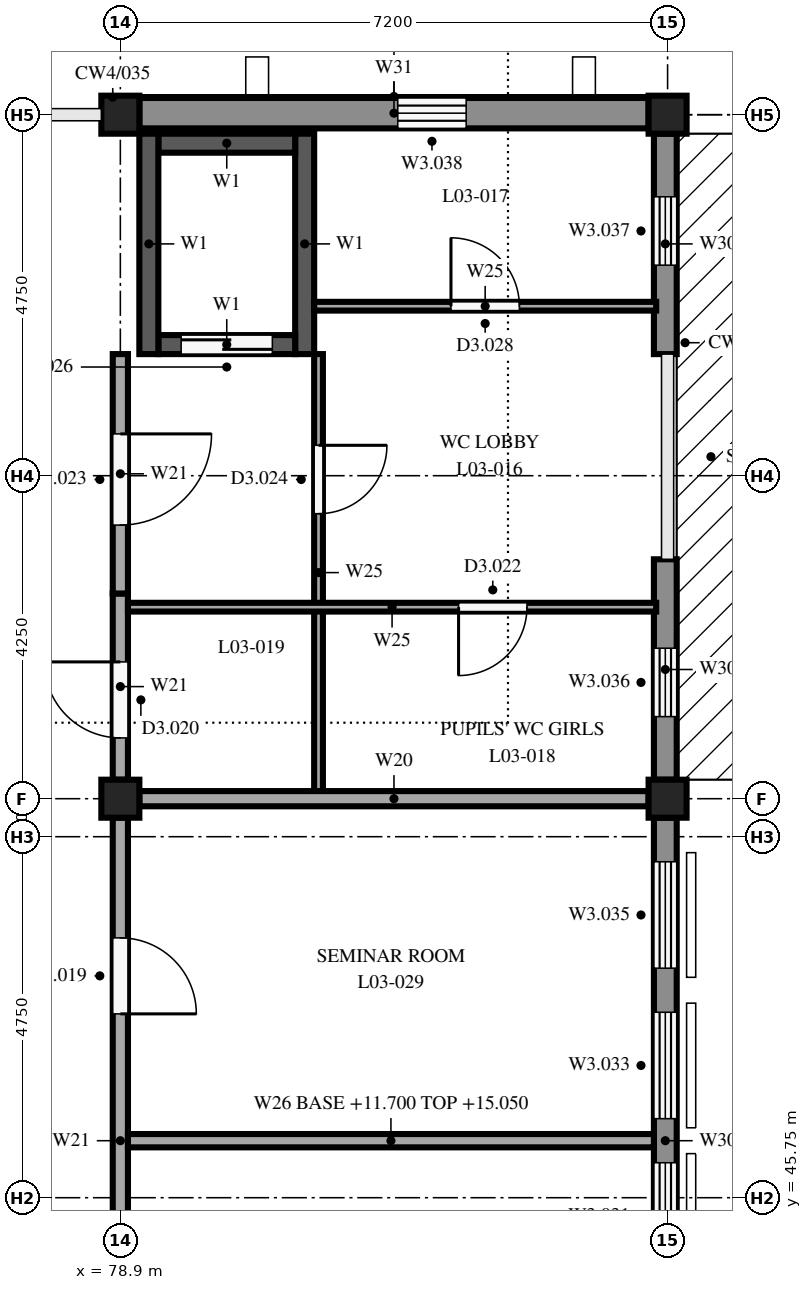
"""IFC4 building model, lengths in metres.
Left out: names, types, materials, properties, quantities, classifications, styles, units other than length and angle.
Written with IfcOpenShell. Run it as: python <this file> out.ifc"""

import sys

from ifc_helpers import new_model, si_unit, direction, frame, frame_2d, origin, origin_2d, place, context, subcontext, project, spatial, rectangle, extrude, element, fill, save


model = new_model("IFC4")
c1 = context("Model", 3, precision=1e-05, world=origin(), true_north=direction((0.0, 1.0)))
c2 = subcontext(c1, "Body", "Model", "MODEL_VIEW")
j1 = project(units=[si_unit("LENGTHUNIT", "METRE"), si_unit("PLANEANGLEUNIT", "RADIAN")], contexts=[c1])
p1 = place(None, origin())
s1 = spatial("IfcSite", under=j1, at=p1, CompositionType="ELEMENT")
p2 = place(p1, origin())
s2 = spatial("IfcBuilding", under=s1, at=p2, CompositionType="ELEMENT")
p3 = place(p2, frame((0.0, 0.0, 11.7)))
s3 = spatial("IfcBuildingStorey", under=s2, at=p3, CompositionType="ELEMENT", Elevation=11.7)
for number, where, z_axis, x_axis in (
    (1, (78.9, 51.0, 0.0), (0.0, 0.0, 1.0), (1.0, 0.0, 0.0)),
    (2, (78.9, 60.0, 0.0), (0.0, 0.0, 1.0), (1.0, 0.0, 0.0)),
    (3, (86.1, 51.0, 0.0), (0.0, 0.0, 1.0), (1.0, 0.0, 0.0)),
    (4, (86.1, 60.0, 0.0), (0.0, 0.0, 1.0), (1.0, 0.0, 0.0)),
):
    element("IfcColumn", number, at=place(p3, frame(where, z_axis=z_axis, x_axis=x_axis)), inside=s3, PredefinedType="COLUMN", context=c2, shape_type="SweptSolid", body=[
        extrude(rectangle(XDim=0.5, YDim=0.5, at=origin_2d()), origin(), (0.0, 0.0, 1.0), 3.35),
    ])
for number, where, z_axis, x_axis in (
    (5, (79.275, 56.85, 0.0), (0.0, 0.0, 1.0), (0.0, 1.0, 0.0)),
    (6, (81.325, 56.85, 0.0), (0.0, 0.0, 1.0), (0.0, 1.0, 0.0)),
):
    element("IfcWall", number, at=place(p3, frame(where, z_axis=z_axis, x_axis=x_axis)), inside=s3, PredefinedType="SHEAR", context=c2, shape_type="SweptSolid", body=[
        extrude(rectangle(XDim=2.9, YDim=0.25, at=frame_2d((1.45, 0.0))), origin(), (0.0, 0.0, 1.0), 3.35),
    ])
p4 = place(p3, frame((79.4, 56.975, 0.0), z_axis=(0.0, 0.0, 1.0), x_axis=(1.0, 0.0, 0.0)))
e7 = element("IfcWall", 7, at=p4, inside=s3, PredefinedType="SHEAR", context=c2, shape_type="SweptSolid", body=[
    extrude(rectangle(XDim=1.8, YDim=0.25, at=frame_2d((0.9, 0.0))), origin(), (0.0, 0.0, 1.0), 3.35),
])
p5 = place(p4, frame((0.3, 0.0, 0.0)))
e8 = element("IfcOpeningElement", 8, at=p5, cuts=e7, PredefinedType="OPENING", context=c2, shape_type="SweptSolid", body=[
    extrude(rectangle(XDim=1.2, YDim=2.1, at=frame_2d((0.6, 1.05))), frame((0.0, 0.135, 0.0), z_axis=(0.0, -1.0, 0.0), x_axis=(1.0, 0.0, 0.0)), (0.0, 0.0, 1.0), 0.27),
])
p6 = place(p3, frame((79.4, 59.625, 0.0), z_axis=(0.0, 0.0, 1.0), x_axis=(1.0, 0.0, 0.0)))
e9 = element("IfcWall", 9, at=p6, inside=s3, PredefinedType="SHEAR", context=c2, shape_type="SweptSolid", body=[
    extrude(rectangle(XDim=1.8, YDim=0.25, at=frame_2d((0.9, 0.0))), origin(), (0.0, 0.0, 1.0), 3.35),
])
p7 = place(p3, frame((86.07, 50.75, 0.0), z_axis=(0.0, 0.0, 1.0), x_axis=(0.0, -1.0, 0.0)))
e10 = element("IfcWall", 10, at=p7, inside=s3, PredefinedType="STANDARD", context=c2, shape_type="SweptSolid", body=[
    extrude(rectangle(XDim=8.5, YDim=0.3, at=frame_2d((4.25, 0.0))), origin(), (0.0, 0.0, 1.0), 2.85),
])
p8 = place(p7, frame((6.52, 0.0, 0.6)))
e11 = element("IfcOpeningElement", 11, at=p8, cuts=e10, PredefinedType="OPENING", context=c2, shape_type="SweptSolid", body=[
    extrude(rectangle(XDim=1.4, YDim=2.2, at=frame_2d((0.7, 1.1))), frame((0.0, 0.16, 0.0), z_axis=(0.0, -1.0, 0.0), x_axis=(1.0, 0.0, 0.0)), (0.0, 0.0, 1.0), 0.32),
])
p9 = place(p7, frame((4.54, 0.0, 0.6)))
e12 = element("IfcOpeningElement", 12, at=p9, cuts=e10, PredefinedType="OPENING", context=c2, shape_type="SweptSolid", body=[
    extrude(rectangle(XDim=1.4, YDim=2.2, at=frame_2d((0.7, 1.1))), frame((0.0, 0.16, 0.0), z_axis=(0.0, -1.0, 0.0), x_axis=(1.0, 0.0, 0.0)), (0.0, 0.0, 1.0), 0.32),
])
p10 = place(p7, frame((2.56, 0.0, 0.6)))
e13 = element("IfcOpeningElement", 13, at=p10, cuts=e10, PredefinedType="OPENING", context=c2, shape_type="SweptSolid", body=[
    extrude(rectangle(XDim=1.4, YDim=2.2, at=frame_2d((0.7, 1.1))), frame((0.0, 0.16, 0.0), z_axis=(0.0, -1.0, 0.0), x_axis=(1.0, 0.0, 0.0)), (0.0, 0.0, 1.0), 0.32),
])
p11 = place(p7, frame((0.58, 0.0, 0.6)))
e14 = element("IfcOpeningElement", 14, at=p11, cuts=e10, PredefinedType="OPENING", context=c2, shape_type="SweptSolid", body=[
    extrude(rectangle(XDim=1.4, YDim=2.2, at=frame_2d((0.7, 1.1))), frame((0.0, 0.16, 0.0), z_axis=(0.0, -1.0, 0.0), x_axis=(1.0, 0.0, 0.0)), (0.0, 0.0, 1.0), 0.32),
])
p12 = place(p3, frame((86.07, 54.15, 0.0), z_axis=(0.0, 0.0, 1.0), x_axis=(0.0, -1.0, 0.0)))
e15 = element("IfcWall", 15, at=p12, inside=s3, PredefinedType="STANDARD", context=c2, shape_type="SweptSolid", body=[
    extrude(rectangle(XDim=2.9, YDim=0.3, at=frame_2d((1.45, 0.0))), origin(), (0.0, 0.0, 1.0), 2.85),
])
p13 = place(p12, frame((1.17, 0.0, 1.6)))
e16 = element("IfcOpeningElement", 16, at=p13, cuts=e15, PredefinedType="OPENING", context=c2, shape_type="SweptSolid", body=[
    extrude(rectangle(XDim=0.9, YDim=1.0, at=frame_2d((0.45, 0.5))), frame((0.0, 0.16, 0.0), z_axis=(0.0, -1.0, 0.0), x_axis=(1.0, 0.0, 0.0)), (0.0, 0.0, 1.0), 0.32),
])
p14 = place(p3, frame((86.07, 59.75, 0.0), z_axis=(0.0, 0.0, 1.0), x_axis=(0.0, -1.0, 0.0)))
e17 = element("IfcWall", 17, at=p14, inside=s3, PredefinedType="STANDARD", context=c2, shape_type="SweptSolid", body=[
    extrude(rectangle(XDim=2.9, YDim=0.3, at=frame_2d((1.45, 0.0))), origin(), (0.0, 0.0, 1.0), 2.85),
])
p15 = place(p14, frame((0.83, 0.0, 1.6)))
e18 = element("IfcOpeningElement", 18, at=p15, cuts=e17, PredefinedType="OPENING", context=c2, shape_type="SweptSolid", body=[
    extrude(rectangle(XDim=0.9, YDim=1.0, at=frame_2d((0.45, 0.5))), frame((0.0, 0.16, 0.0), z_axis=(0.0, -1.0, 0.0), x_axis=(1.0, 0.0, 0.0)), (0.0, 0.0, 1.0), 0.32),
])
p16 = place(p3, frame((79.15, 60.02, 0.0), z_axis=(0.0, 0.0, 1.0), x_axis=(1.0, 0.0, 0.0)))
e19 = element("IfcWall", 19, at=p16, inside=s3, PredefinedType="STANDARD", context=c2, shape_type="SweptSolid", body=[
    extrude(rectangle(XDim=6.7, YDim=0.4, at=frame_2d((3.35, 0.0))), origin(), (0.0, 0.0, 1.0), 2.9),
])
p17 = place(p16, frame((3.4, 0.0, 1.6)))
e20 = element("IfcOpeningElement", 20, at=p17, cuts=e19, PredefinedType="OPENING", context=c2, shape_type="SweptSolid", body=[
    extrude(rectangle(XDim=0.9, YDim=1.0, at=frame_2d((0.45, 0.5))), frame((0.0, 0.21, 0.0), z_axis=(0.0, -1.0, 0.0), x_axis=(1.0, 0.0, 0.0)), (0.0, 0.0, 1.0), 0.42),
])
p18 = place(p3, frame((78.9, 51.25, 0.0), z_axis=(0.0, 0.0, 1.0), x_axis=(0.0, 1.0, 0.0)))
e21 = element("IfcWall", 21, at=p18, inside=s3, PredefinedType="PARTITIONING", context=c2, shape_type="SweptSolid", body=[
    extrude(rectangle(XDim=2.45, YDim=0.2, at=frame_2d((1.225, 0.0))), origin(), (0.0, 0.0, 1.0), 2.9),
])
p19 = place(p18, frame((0.55, 0.0, 0.0)))
e22 = element("IfcOpeningElement", 22, at=p19, cuts=e21, PredefinedType="OPENING", context=c2, shape_type="SweptSolid", body=[
    extrude(rectangle(XDim=1.0, YDim=2.1, at=frame_2d((0.5, 1.05))), frame((0.0, 0.11, 0.0), z_axis=(0.0, -1.0, 0.0), x_axis=(1.0, 0.0, 0.0)), (0.0, 0.0, 1.0), 0.22),
])
p20 = place(p3, frame((78.9, 56.85, 0.0), z_axis=(0.0, 0.0, 1.0), x_axis=(0.0, -1.0, 0.0)))
e23 = element("IfcWall", 23, at=p20, inside=s3, PredefinedType="PARTITIONING", context=c2, shape_type="SweptSolid", body=[
    extrude(rectangle(XDim=3.15, YDim=0.2, at=frame_2d((1.575, 0.0))), origin(), (0.0, 0.0, 1.0), 2.9),
])
p21 = place(p20, frame((1.05, 0.0, 0.0)))
e24 = element("IfcOpeningElement", 24, at=p21, cuts=e23, PredefinedType="OPENING", context=c2, shape_type="SweptSolid", body=[
    extrude(rectangle(XDim=1.2, YDim=2.1, at=frame_2d((0.6, 1.05))), frame((0.0, 0.11, 0.0), z_axis=(0.0, -1.0, 0.0), x_axis=(1.0, 0.0, 0.0)), (0.0, 0.0, 1.0), 0.22),
])
p22 = place(p3, frame((79.15, 51.0, 0.0), z_axis=(0.0, 0.0, 1.0), x_axis=(1.0, 0.0, 0.0)))
e25 = element("IfcWall", 25, at=p22, inside=s3, PredefinedType="PARTITIONING", context=c2, shape_type="SweptSolid", body=[
    extrude(rectangle(XDim=6.7, YDim=0.2, at=frame_2d((3.35, 0.0))), origin(), (0.0, 0.0, 1.0), 2.9),
])
p23 = place(p3, frame((81.508, 56.85, 0.0), z_axis=(0.0, 0.0, 1.0), x_axis=(0.0, -1.0, 0.0)))
e26 = element("IfcWall", 26, at=p23, inside=s3, PredefinedType="PARTITIONING", context=c2, shape_type="SweptSolid", body=[
    extrude(rectangle(XDim=5.75, YDim=0.115, at=frame_2d((2.875, 0.0))), origin(), (0.0, 0.0, 1.0), 3.35),
])
p24 = place(p23, frame((1.2, 0.0, 0.0)))
e27 = element("IfcOpeningElement", 27, at=p24, cuts=e26, PredefinedType="OPENING", context=c2, shape_type="SweptSolid", body=[
    extrude(rectangle(XDim=0.9, YDim=2.1, at=frame_2d((0.45, 1.05))), frame((0.0, 0.067, 0.0), z_axis=(0.0, -1.0, 0.0), x_axis=(1.0, 0.0, 0.0)), (0.0, 0.0, 1.0), 0.135),
])
p25 = place(p3, frame((81.45, 57.48, 0.0), z_axis=(0.0, 0.0, 1.0), x_axis=(1.0, 0.0, 0.0)))
e28 = element("IfcWall", 28, at=p25, inside=s3, PredefinedType="PARTITIONING", context=c2, shape_type="SweptSolid", body=[
    extrude(rectangle(XDim=4.5, YDim=0.115, at=frame_2d((2.25, 0.0))), origin(), (0.0, 0.0, 1.0), 3.35),
])
p26 = place(p25, frame((1.8, 0.0, 0.0)))
e29 = element("IfcOpeningElement", 29, at=p26, cuts=e28, PredefinedType="OPENING", context=c2, shape_type="SweptSolid", body=[
    extrude(rectangle(XDim=0.9, YDim=2.1, at=frame_2d((0.45, 1.05))), frame((0.0, 0.067, 0.0), z_axis=(0.0, -1.0, 0.0), x_axis=(1.0, 0.0, 0.0)), (0.0, 0.0, 1.0), 0.135),
])
p27 = place(p3, frame((85.95, 53.52, 0.0), z_axis=(0.0, 0.0, 1.0), x_axis=(-1.0, 0.0, 0.0)))
e30 = element("IfcWall", 30, at=p27, inside=s3, PredefinedType="PARTITIONING", context=c2, shape_type="SweptSolid", body=[
    extrude(rectangle(XDim=6.95, YDim=0.115, at=frame_2d((3.475, 0.0))), origin(), (0.0, 0.0, 1.0), 3.35),
])
p28 = place(p27, frame((1.7, 0.0, 0.0)))
e31 = element("IfcOpeningElement", 31, at=p28, cuts=e30, PredefinedType="OPENING", context=c2, shape_type="SweptSolid", body=[
    extrude(rectangle(XDim=0.9, YDim=2.1, at=frame_2d((0.45, 1.05))), frame((0.0, 0.067, 0.0), z_axis=(0.0, -1.0, 0.0), x_axis=(1.0, 0.0, 0.0)), (0.0, 0.0, 1.0), 0.135),
])
p29 = place(p3, frame((78.9, 50.75, 0.0), z_axis=(0.0, 0.0, 1.0), x_axis=(0.0, -1.0, 0.0)))
e32 = element("IfcWall", 32, at=p29, inside=s3, PredefinedType="PARTITIONING", context=c2, shape_type="SweptSolid", body=[
    extrude(rectangle(XDim=8.5, YDim=0.2, at=frame_2d((4.25, 0.0))), origin(), (0.0, 0.0, 1.0), 2.9),
])
p30 = place(p29, frame((5.919, 0.0, 0.0)))
e33 = element("IfcOpeningElement", 33, at=p30, cuts=e32, PredefinedType="OPENING", context=c2, shape_type="SweptSolid", body=[
    extrude(rectangle(XDim=1.0, YDim=2.1, at=frame_2d((0.5, 1.05))), frame((0.0, 0.11, 0.0), z_axis=(0.0, -1.0, 0.0), x_axis=(1.0, 0.0, 0.0)), (0.0, 0.0, 1.0), 0.22),
])
p31 = place(p29, frame((1.581, 0.0, 0.0)))
e34 = element("IfcOpeningElement", 34, at=p31, cuts=e32, PredefinedType="OPENING", context=c2, shape_type="SweptSolid", body=[
    extrude(rectangle(XDim=1.0, YDim=2.1, at=frame_2d((0.5, 1.05))), frame((0.0, 0.11, 0.0), z_axis=(0.0, -1.0, 0.0), x_axis=(1.0, 0.0, 0.0)), (0.0, 0.0, 1.0), 0.22),
])
p32 = place(p3, frame((79.0, 46.5, 0.0), z_axis=(0.0, 0.0, 1.0), x_axis=(1.0, 0.0, 0.0)))
e35 = element("IfcWall", 35, at=p32, inside=s3, PredefinedType="PARTITIONING", context=c2, shape_type="SweptSolid", body=[
    extrude(rectangle(XDim=6.92, YDim=0.175, at=frame_2d((3.46, 0.0))), origin(), (0.0, 0.0, 1.0), 3.35),
])
p33 = place(p9, origin())
e36 = element("IfcWindow", 36, at=p33, inside=s3, PartitioningType="DOUBLE_PANEL_VERTICAL", PredefinedType="WINDOW", context=c2, shape_type="SweptSolid", body=[
    extrude(rectangle(XDim=1.4, YDim=2.2, at=frame_2d((0.7, 1.1))), frame((0.0, 0.03, 0.0), z_axis=(0.0, -1.0, 0.0), x_axis=(1.0, 0.0, 0.0)), (0.0, 0.0, 1.0), 0.06),
])
fill(e12, e36)
p34 = place(p10, origin())
e37 = element("IfcWindow", 37, at=p34, inside=s3, PartitioningType="DOUBLE_PANEL_VERTICAL", PredefinedType="WINDOW", context=c2, shape_type="SweptSolid", body=[
    extrude(rectangle(XDim=1.4, YDim=2.2, at=frame_2d((0.7, 1.1))), frame((0.0, 0.03, 0.0), z_axis=(0.0, -1.0, 0.0), x_axis=(1.0, 0.0, 0.0)), (0.0, 0.0, 1.0), 0.06),
])
fill(e13, e37)
p35 = place(p11, origin())
e38 = element("IfcWindow", 38, at=p35, inside=s3, PartitioningType="DOUBLE_PANEL_VERTICAL", PredefinedType="WINDOW", context=c2, shape_type="SweptSolid", body=[
    extrude(rectangle(XDim=1.4, YDim=2.2, at=frame_2d((0.7, 1.1))), frame((0.0, 0.03, 0.0), z_axis=(0.0, -1.0, 0.0), x_axis=(1.0, 0.0, 0.0)), (0.0, 0.0, 1.0), 0.06),
])
fill(e14, e38)
p36 = place(p13, origin())
e39 = element("IfcWindow", 39, at=p36, inside=s3, PartitioningType="SINGLE_PANEL", PredefinedType="WINDOW", context=c2, shape_type="SweptSolid", body=[
    extrude(rectangle(XDim=0.9, YDim=1.0, at=frame_2d((0.45, 0.5))), frame((0.0, 0.03, 0.0), z_axis=(0.0, -1.0, 0.0), x_axis=(1.0, 0.0, 0.0)), (0.0, 0.0, 1.0), 0.06),
])
fill(e16, e39)
p37 = place(p15, origin())
e40 = element("IfcWindow", 40, at=p37, inside=s3, PartitioningType="SINGLE_PANEL", PredefinedType="WINDOW", context=c2, shape_type="SweptSolid", body=[
    extrude(rectangle(XDim=0.9, YDim=1.0, at=frame_2d((0.45, 0.5))), frame((0.0, 0.03, 0.0), z_axis=(0.0, -1.0, 0.0), x_axis=(1.0, 0.0, 0.0)), (0.0, 0.0, 1.0), 0.06),
])
fill(e18, e40)
p38 = place(p17, origin())
e41 = element("IfcWindow", 41, at=p38, inside=s3, PartitioningType="SINGLE_PANEL", PredefinedType="WINDOW", context=c2, shape_type="SweptSolid", body=[
    extrude(rectangle(XDim=0.9, YDim=1.0, at=frame_2d((0.45, 0.5))), frame((0.0, 0.03, 0.0), z_axis=(0.0, -1.0, 0.0), x_axis=(1.0, 0.0, 0.0)), (0.0, 0.0, 1.0), 0.06),
])
fill(e20, e41)
p39 = place(p19, origin())
e42 = element("IfcDoor", 42, at=p39, inside=s3, OperationType="SINGLE_SWING_RIGHT", PredefinedType="DOOR", context=c2, shape_type="SweptSolid", body=[
    extrude(rectangle(XDim=1.0, YDim=2.1, at=frame_2d((0.5, 1.05))), frame((0.0, 0.025, 0.0), z_axis=(0.0, -1.0, 0.0), x_axis=(1.0, 0.0, 0.0)), (0.0, 0.0, 1.0), 0.05),
])
fill(e22, e42)
p40 = place(p21, origin())
e43 = element("IfcDoor", 43, at=p40, inside=s3, OperationType="SINGLE_SWING_LEFT", PredefinedType="DOOR", context=c2, shape_type="SweptSolid", body=[
    extrude(rectangle(XDim=1.2, YDim=2.1, at=frame_2d((0.6, 1.05))), frame((0.0, 0.025, 0.0), z_axis=(0.0, -1.0, 0.0), x_axis=(1.0, 0.0, 0.0)), (0.0, 0.0, 1.0), 0.05),
])
fill(e24, e43)
p41 = place(p24, origin())
e44 = element("IfcDoor", 44, at=p41, inside=s3, OperationType="SINGLE_SWING_LEFT", PredefinedType="DOOR", context=c2, shape_type="SweptSolid", body=[
    extrude(rectangle(XDim=0.9, YDim=2.1, at=frame_2d((0.45, 1.05))), frame((0.0, 0.025, 0.0), z_axis=(0.0, -1.0, 0.0), x_axis=(1.0, 0.0, 0.0)), (0.0, 0.0, 1.0), 0.05),
])
fill(e27, e44)
p42 = place(p26, origin())
e45 = element("IfcDoor", 45, at=p42, inside=s3, OperationType="SINGLE_SWING_LEFT", PredefinedType="DOOR", context=c2, shape_type="SweptSolid", body=[
    extrude(rectangle(XDim=0.9, YDim=2.1, at=frame_2d((0.45, 1.05))), frame((0.0, 0.025, 0.0), z_axis=(0.0, -1.0, 0.0), x_axis=(1.0, 0.0, 0.0)), (0.0, 0.0, 1.0), 0.05),
])
fill(e29, e45)
p43 = place(p28, origin())
e46 = element("IfcDoor", 46, at=p43, inside=s3, OperationType="SINGLE_SWING_RIGHT", PredefinedType="DOOR", context=c2, shape_type="SweptSolid", body=[
    extrude(rectangle(XDim=0.9, YDim=2.1, at=frame_2d((0.45, 1.05))), frame((0.0, 0.025, 0.0), z_axis=(0.0, -1.0, 0.0), x_axis=(1.0, 0.0, 0.0)), (0.0, 0.0, 1.0), 0.05),
])
fill(e31, e46)
p44 = place(p31, origin())
e47 = element("IfcDoor", 47, at=p44, inside=s3, OperationType="SINGLE_SWING_RIGHT", PredefinedType="DOOR", context=c2, shape_type="SweptSolid", body=[
    extrude(rectangle(XDim=1.0, YDim=2.1, at=frame_2d((0.5, 1.05))), frame((0.0, 0.025, 0.0), z_axis=(0.0, -1.0, 0.0), x_axis=(1.0, 0.0, 0.0)), (0.0, 0.0, 1.0), 0.05),
])
fill(e34, e47)
p45 = place(p5, origin())
e48 = element("IfcDoor", 48, at=p45, inside=s3, OperationType="SLIDING_TO_LEFT", PredefinedType="DOOR", context=c2, shape_type="SweptSolid", body=[
    extrude(rectangle(XDim=1.2, YDim=2.1, at=frame_2d((0.6, 1.05))), frame((0.0, 0.025, 0.0), z_axis=(0.0, -1.0, 0.0), x_axis=(1.0, 0.0, 0.0)), (0.0, 0.0, 1.0), 0.05),
])
fill(e8, e48)
save(model, sys.argv[1])
